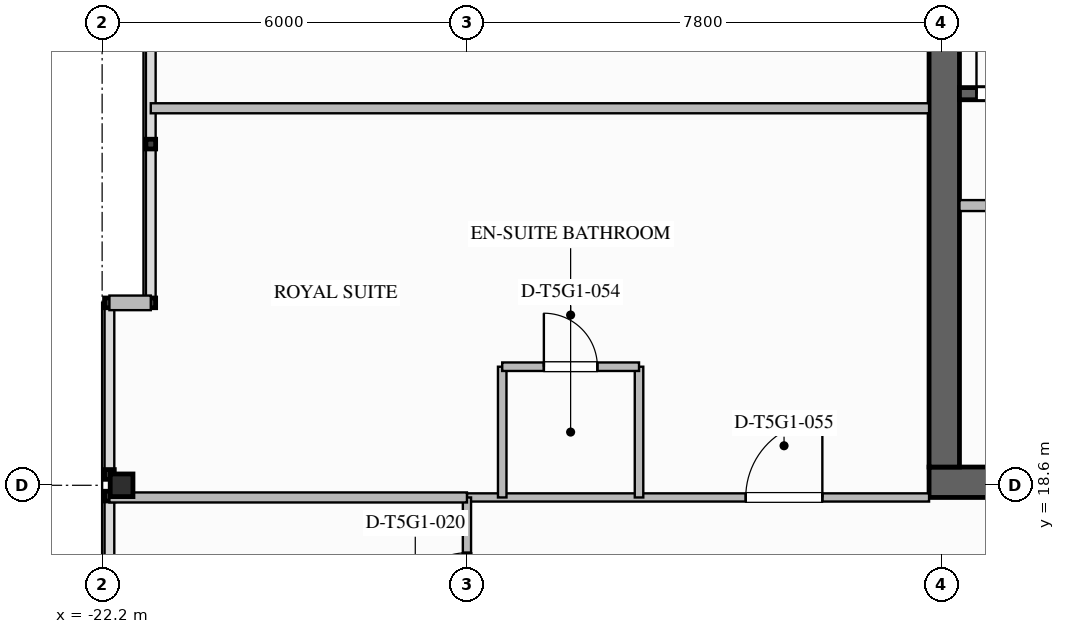
"""IFC4 building model, lengths in metres.
Left out: names, types, materials, properties, quantities, classifications, styles, units other than length and angle.
Written with IfcOpenShell. Run it as: python <this file> out.ifc"""

import sys

from ifc_helpers import new_model, si_unit, direction, frame, frame_2d, origin, origin_2d, place, context, subcontext, project, spatial, rectangle, i_section, extrude, element, fill, save


model = new_model("IFC4")
c1 = context("Model", 3, precision=1e-05, world=origin(), true_north=direction((0.0, 1.0)))
c2 = subcontext(c1, "Body", "Model", "MODEL_VIEW")
j1 = project(units=[si_unit("LENGTHUNIT", "METRE"), si_unit("PLANEANGLEUNIT", "RADIAN")], contexts=[c1])
p1 = place(None, origin())
s1 = spatial("IfcSite", under=j1, at=p1, CompositionType="ELEMENT")
p2 = place(p1, origin())
s2 = spatial("IfcBuilding", under=s1, at=p2, CompositionType="ELEMENT")
p3 = place(p2, frame((0.0, 0.0, 268.65)))
s3 = spatial("IfcBuildingStorey", under=s2, at=p3, CompositionType="ELEMENT", Elevation=268.65)
p4 = place(p3, frame((8.6, 18.65, 0.0), z_axis=(0.0, 0.0, 1.0), x_axis=(-1.0, 0.0, 0.0)))
e1 = element("IfcWall", 1, at=p4, inside=s3, PredefinedType="SHEAR", context=c2, shape_type="SweptSolid", body=[
    extrude(rectangle(XDim=17.2, YDim=0.5, at=frame_2d((8.6, 0.0))), origin(), (0.0, 0.0, 1.0), 3.65),
])
p5 = place(p3, frame((-8.35, 18.9, 0.0), z_axis=(0.0, 0.0, 1.0), x_axis=(0.0, 1.0, 0.0)))
e2 = element("IfcWall", 2, at=p5, inside=s3, PredefinedType="SHEAR", context=c2, shape_type="SweptSolid", body=[
    extrude(rectangle(XDim=16.2, YDim=0.5, at=frame_2d((8.1, 0.0))), origin(), (0.0, 0.0, 1.0), 3.65),
])
p6 = place(p3, frame((-21.88, 18.6, 0.0), z_axis=(0.0, 0.0, 1.0), x_axis=(1.0, 0.0, 0.0)))
e3 = element("IfcColumn", 3, at=p6, inside=s3, PredefinedType="COLUMN", context=c2, shape_type="SweptSolid", body=[
    extrude(i_section(OverallWidth=0.374, OverallDepth=0.372, WebThickness=0.016, FlangeThickness=0.026, FilletRadius=0.025, at=origin_2d()), origin(), (0.0, 0.0, 1.0), 3.647),
])
p7 = place(p3, frame((-22.08, 21.6, 0.0), z_axis=(0.0, 0.0, 1.0), x_axis=(1.0, 0.0, 0.0)))
e4 = element("IfcWall", 4, at=p7, inside=s3, PredefinedType="STANDARD", context=c2, shape_type="SweptSolid", body=[
    extrude(rectangle(XDim=0.68, YDim=0.24, at=frame_2d((0.34, 0.0))), origin(), (0.0, 0.0, 1.0), 3.39),
])
p8 = place(p3, frame((-8.1, 25.04, 0.0), z_axis=(0.0, 0.0, 1.0), x_axis=(1.0, 0.0, 0.0)))
e5 = element("IfcWall", 5, at=p8, inside=s3, PredefinedType="SOLIDWALL", context=c2, shape_type="SweptSolid", body=[
    extrude(rectangle(XDim=8.1, YDim=0.2, at=frame_2d((4.05, 0.0))), origin(), (0.0, 0.0, 1.0), 3.39),
])
p9 = place(p8, frame((0.28, 0.0, 0.0)))
e6 = element("IfcOpeningElement", 6, at=p9, cuts=e5, PredefinedType="OPENING", context=c2, shape_type="SweptSolid", body=[
    extrude(rectangle(XDim=1.05, YDim=2.1, at=frame_2d((0.525, 1.05))), frame((0.0, 0.11, 0.0), z_axis=(0.0, -1.0, 0.0), x_axis=(1.0, 0.0, 0.0)), (0.0, 0.0, 1.0), 0.22),
])
p10 = place(p3, frame((-8.1, 23.2, 0.0), z_axis=(0.0, 0.0, 1.0), x_axis=(1.0, 0.0, 0.0)))
e7 = element("IfcWall", 7, at=p10, inside=s3, PredefinedType="SOLIDWALL", context=c2, shape_type="SweptSolid", body=[
    extrude(rectangle(XDim=16.2, YDim=0.18, at=frame_2d((8.1, 0.0))), origin(), (0.0, 0.0, 1.0), 3.39),
])
p11 = place(p10, frame((1.4, 0.0, 0.0)))
e8 = element("IfcOpeningElement", 8, at=p11, cuts=e7, PredefinedType="OPENING", context=c2, shape_type="SweptSolid", body=[
    extrude(rectangle(XDim=1.0, YDim=2.1, at=frame_2d((0.5, 1.05))), frame((0.0, 0.1, 0.0), z_axis=(0.0, -1.0, 0.0), x_axis=(1.0, 0.0, 0.0)), (0.0, 0.0, 1.0), 0.2),
])
p12 = place(p10, frame((5.6, 0.0, 0.0)))
e9 = element("IfcOpeningElement", 9, at=p12, cuts=e7, PredefinedType="OPENING", context=c2, shape_type="SweptSolid", body=[
    extrude(rectangle(XDim=1.0, YDim=2.1, at=frame_2d((0.5, 1.05))), frame((0.0, 0.1, 0.0), z_axis=(0.0, -1.0, 0.0), x_axis=(1.0, 0.0, 0.0)), (0.0, 0.0, 1.0), 0.2),
])
p13 = place(p10, frame((9.8, 0.0, 0.0)))
e10 = element("IfcOpeningElement", 10, at=p13, cuts=e7, PredefinedType="OPENING", context=c2, shape_type="SweptSolid", body=[
    extrude(rectangle(XDim=0.92, YDim=2.1, at=frame_2d((0.46, 1.05))), frame((0.0, 0.1, 0.0), z_axis=(0.0, -1.0, 0.0), x_axis=(1.0, 0.0, 0.0)), (0.0, 0.0, 1.0), 0.2),
])
p14 = place(p10, frame((13.8, 0.0, 0.0)))
e11 = element("IfcOpeningElement", 11, at=p14, cuts=e7, PredefinedType="OPENING", context=c2, shape_type="SweptSolid", body=[
    extrude(rectangle(XDim=1.0, YDim=2.1, at=frame_2d((0.5, 1.05))), frame((0.0, 0.1, 0.0), z_axis=(0.0, -1.0, 0.0), x_axis=(1.0, 0.0, 0.0)), (0.0, 0.0, 1.0), 0.2),
])
p15 = place(p3, frame((-16.2, 18.4, 0.0), z_axis=(0.0, 0.0, 1.0), x_axis=(1.0, 0.0, 0.0)))
e12 = element("IfcWall", 12, at=p15, inside=s3, PredefinedType="PARTITIONING", context=c2, shape_type="SweptSolid", body=[
    extrude(rectangle(XDim=7.6, YDim=0.135, at=frame_2d((3.8, 0.0))), origin(), (0.0, 0.0, 1.0), 2.768),
])
p16 = place(p15, frame((4.585, 0.0, 0.0)))
e13 = element("IfcOpeningElement", 13, at=p16, cuts=e12, PredefinedType="OPENING", context=c2, shape_type="SweptSolid", body=[
    extrude(rectangle(XDim=1.26, YDim=2.2, at=frame_2d((0.63, 1.1))), frame((0.0, 0.077, 0.0), z_axis=(0.0, -1.0, 0.0), x_axis=(1.0, 0.0, 0.0)), (0.0, 0.0, 1.0), 0.155),
])
p17 = place(p3, frame((-16.2, 15.95, 0.0), z_axis=(0.0, 0.0, 1.0), x_axis=(0.0, 1.0, 0.0)))
e14 = element("IfcWall", 14, at=p17, inside=s3, PredefinedType="PARTITIONING", context=c2, shape_type="SweptSolid", body=[
    extrude(rectangle(XDim=2.45, YDim=0.135, at=frame_2d((1.225, 0.0))), origin(), (0.0, 0.0, 1.0), 2.764),
])
p18 = place(p17, frame((0.52, 0.0, 0.0)))
e15 = element("IfcOpeningElement", 15, at=p18, cuts=e14, PredefinedType="OPENING", context=c2, shape_type="SweptSolid", body=[
    extrude(rectangle(XDim=1.02, YDim=2.15, at=frame_2d((0.51, 1.075))), frame((0.0, 0.077, 0.0), z_axis=(0.0, -1.0, 0.0), x_axis=(1.0, 0.0, 0.0)), (0.0, 0.0, 1.0), 0.155),
])
p19 = place(p3, frame((-22.08, 18.4, 0.0), z_axis=(0.0, 0.0, 1.0), x_axis=(1.0, 0.0, 0.0)))
e16 = element("IfcWall", 16, at=p19, inside=s3, PredefinedType="PARTITIONING", context=c2, shape_type="SweptSolid", body=[
    extrude(rectangle(XDim=5.88, YDim=0.165, at=frame_2d((2.94, 0.0))), origin(), (0.0, 0.0, 1.0), 2.764),
])
p20 = place(p3, frame((-21.4, 24.8, 0.0), z_axis=(0.0, 0.0, 1.0), x_axis=(1.0, 0.0, 0.0)))
e17 = element("IfcWall", 17, at=p20, inside=s3, PredefinedType="PARTITIONING", context=c2, shape_type="SweptSolid", body=[
    extrude(rectangle(XDim=12.8, YDim=0.165, at=frame_2d((6.4, 0.0))), origin(), (0.0, 0.0, 1.0), 3.39),
])
for number, where, z_axis, x_axis in (
    (18, (-15.62, 18.4, 0.0), (0.0, 0.0, 1.0), (0.0, 1.0, 0.0)),
    (19, (-13.37, 18.4, 0.0), (0.0, 0.0, 1.0), (0.0, 1.0, 0.0)),
):
    element("IfcWall", number, at=place(p3, frame(where, z_axis=z_axis, x_axis=x_axis)), inside=s3, PredefinedType="PLUMBINGWALL", context=c2, shape_type="SweptSolid", body=[
        extrude(rectangle(XDim=2.15, YDim=0.14, at=frame_2d((1.075, 0.0))), origin(), (0.0, 0.0, 1.0), 3.39),
    ])
p21 = place(p3, frame((-15.62, 20.55, 0.0), z_axis=(0.0, 0.0, 1.0), x_axis=(1.0, 0.0, 0.0)))
e20 = element("IfcWall", 20, at=p21, inside=s3, PredefinedType="PLUMBINGWALL", context=c2, shape_type="SweptSolid", body=[
    extrude(rectangle(XDim=2.25, YDim=0.14, at=frame_2d((1.125, 0.0))), origin(), (0.0, 0.0, 1.0), 3.39),
])
p22 = place(p21, frame((0.685, 0.0, 0.0)))
e21 = element("IfcOpeningElement", 21, at=p22, cuts=e20, PredefinedType="OPENING", context=c2, shape_type="SweptSolid", body=[
    extrude(rectangle(XDim=0.88, YDim=2.1, at=frame_2d((0.44, 1.05))), frame((0.0, 0.08, 0.0), z_axis=(0.0, -1.0, 0.0), x_axis=(1.0, 0.0, 0.0)), (0.0, 0.0, 1.0), 0.16),
])
p23 = place(p9, origin())
e22 = element("IfcDoor", 22, at=p23, inside=s3, OperationType="SINGLE_SWING_LEFT", PredefinedType="DOOR", context=c2, shape_type="SweptSolid", body=[
    extrude(rectangle(XDim=1.05, YDim=2.1, at=frame_2d((0.525, 1.05))), frame((0.0, 0.025, 0.0), z_axis=(0.0, -1.0, 0.0), x_axis=(1.0, 0.0, 0.0)), (0.0, 0.0, 1.0), 0.05),
])
fill(e6, e22)
p24 = place(p18, origin())
e23 = element("IfcDoor", 23, at=p24, inside=s3, OperationType="SINGLE_SWING_LEFT", PredefinedType="DOOR", context=c2, shape_type="SweptSolid", body=[
    extrude(rectangle(XDim=1.02, YDim=2.15, at=frame_2d((0.51, 1.075))), frame((0.0, 0.025, 0.0), z_axis=(0.0, -1.0, 0.0), x_axis=(1.0, 0.0, 0.0)), (0.0, 0.0, 1.0), 0.05),
])
fill(e15, e23)
p25 = place(p22, origin())
e24 = element("IfcDoor", 24, at=p25, inside=s3, OperationType="SINGLE_SWING_LEFT", PredefinedType="DOOR", context=c2, shape_type="SweptSolid", body=[
    extrude(rectangle(XDim=0.88, YDim=2.1, at=frame_2d((0.44, 1.05))), frame((0.0, 0.025, 0.0), z_axis=(0.0, -1.0, 0.0), x_axis=(1.0, 0.0, 0.0)), (0.0, 0.0, 1.0), 0.05),
])
fill(e21, e24)
p26 = place(p16, origin())
e25 = element("IfcDoor", 25, at=p26, inside=s3, OperationType="SINGLE_SWING_RIGHT", PredefinedType="DOOR", context=c2, shape_type="SweptSolid", body=[
    extrude(rectangle(XDim=1.26, YDim=2.2, at=frame_2d((0.63, 1.1))), frame((0.0, 0.025, 0.0), z_axis=(0.0, -1.0, 0.0), x_axis=(1.0, 0.0, 0.0)), (0.0, 0.0, 1.0), 0.05),
])
fill(e13, e25)
save(model, sys.argv[1])
